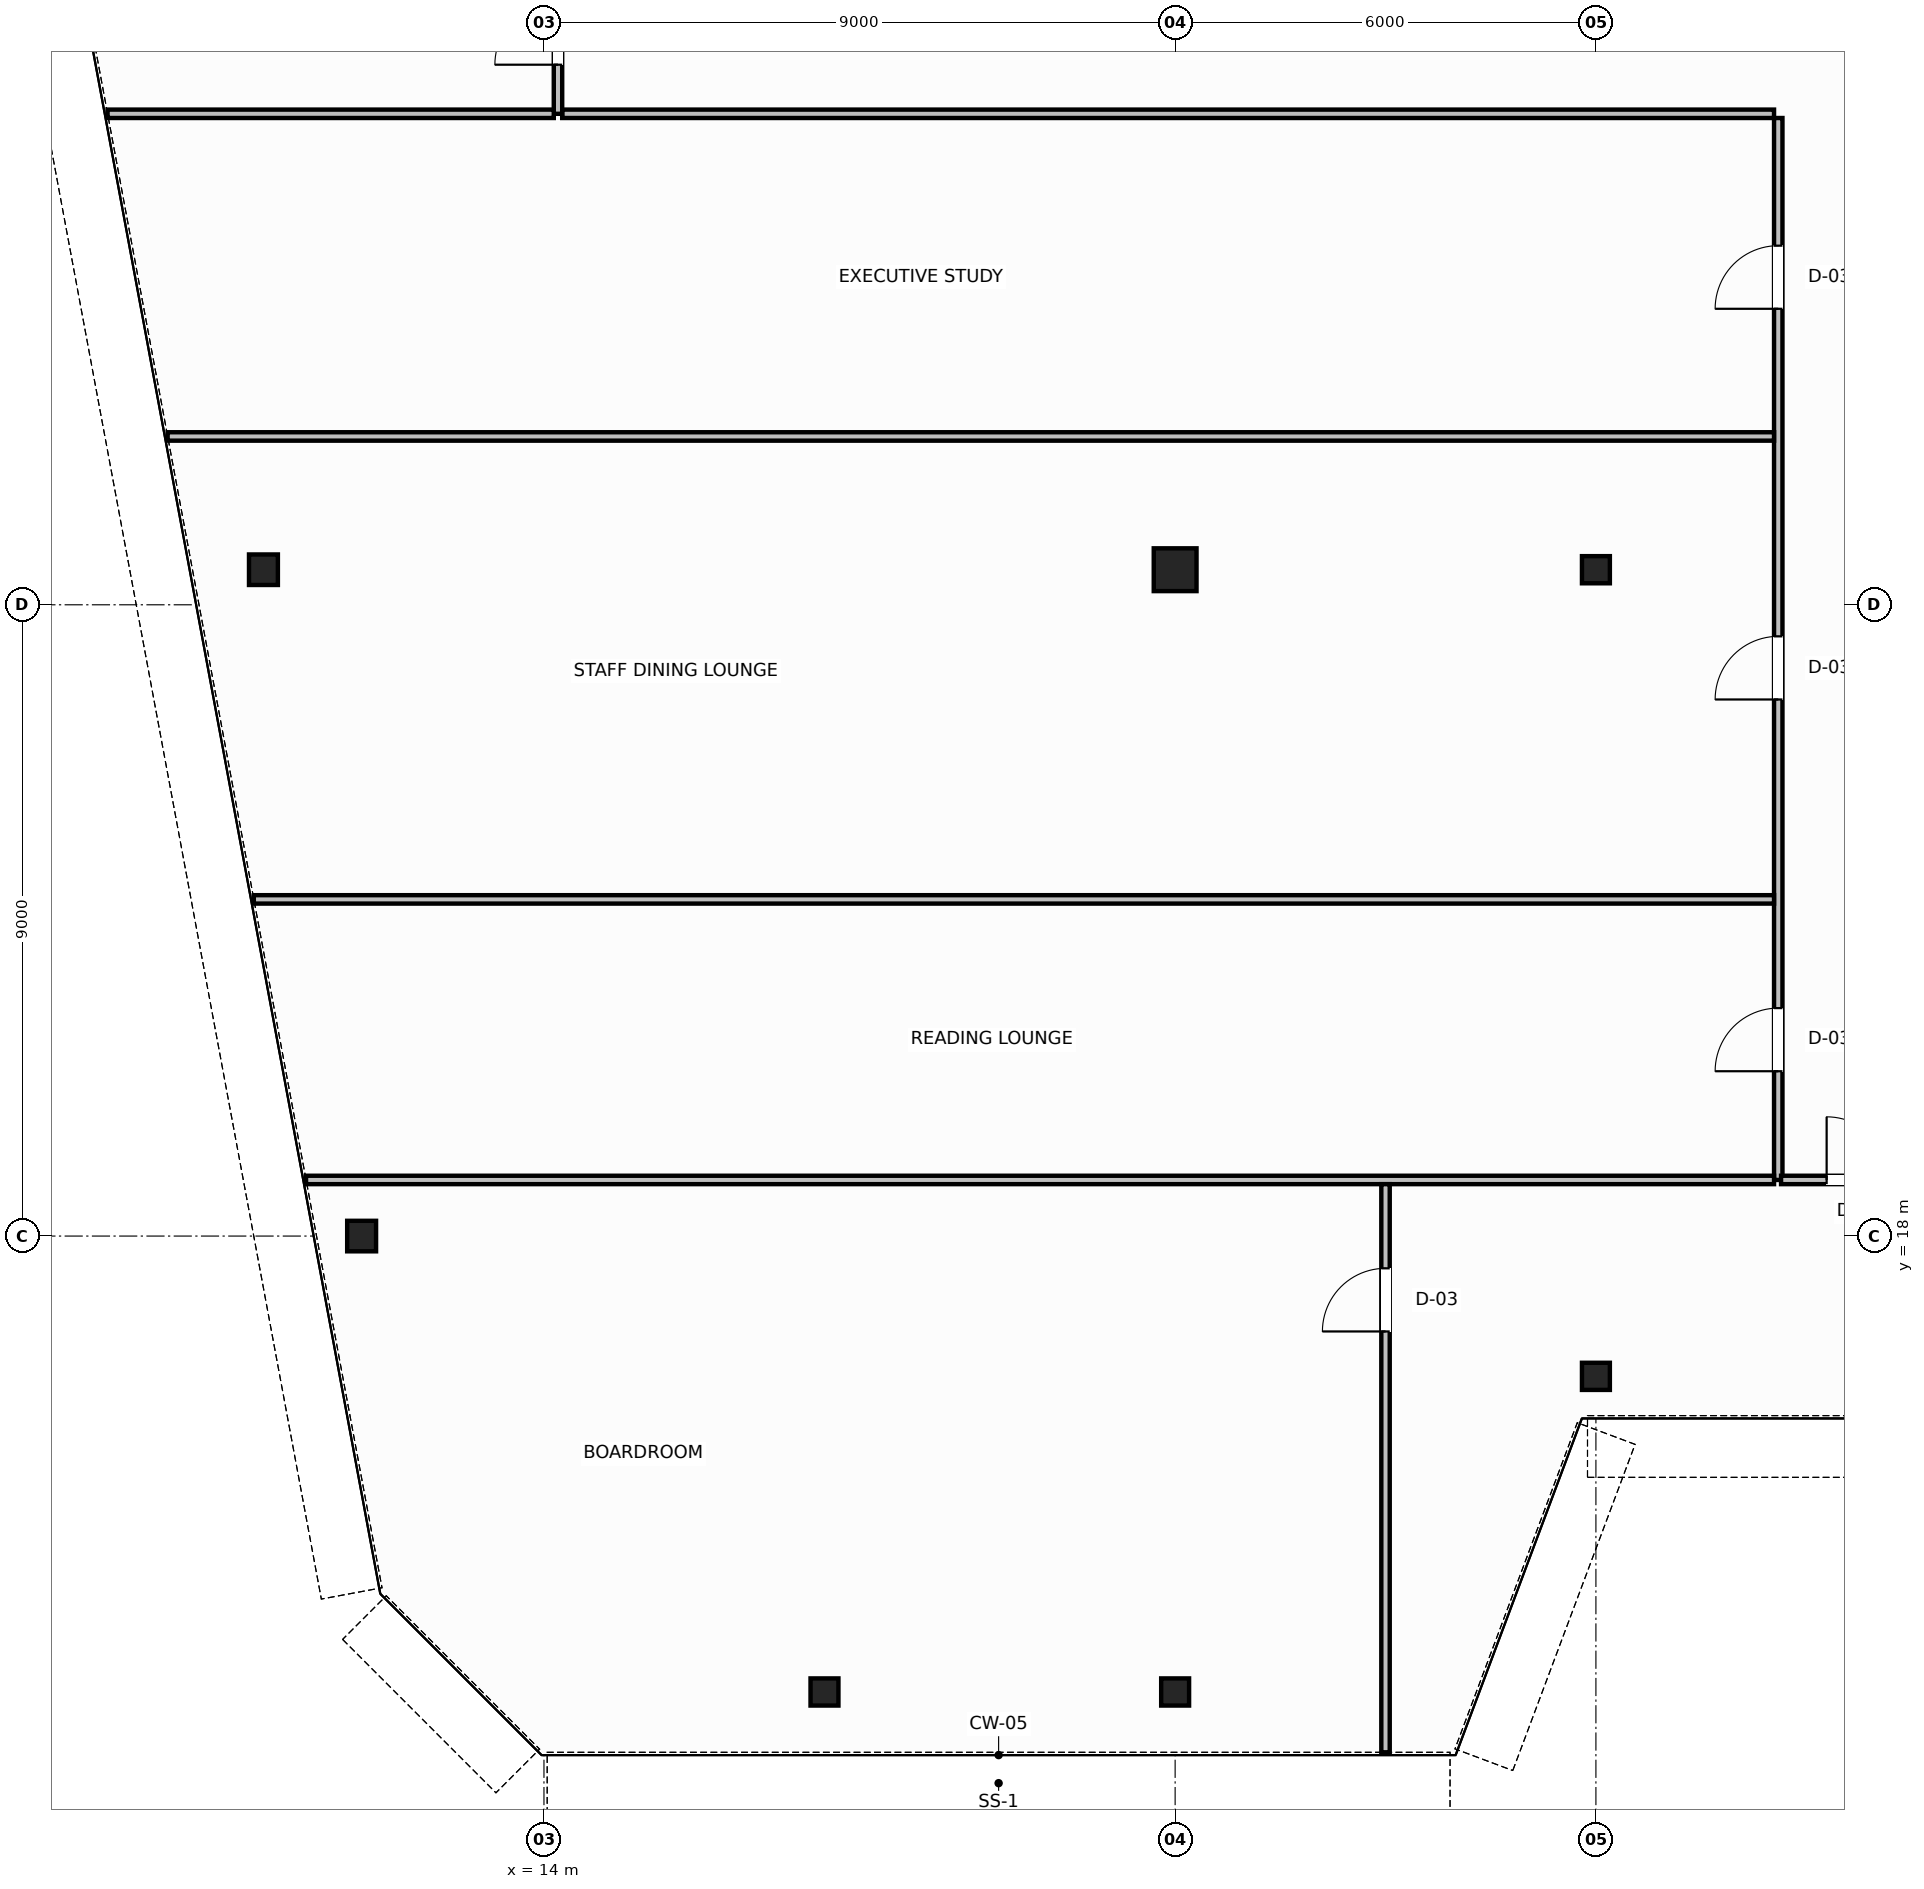
"""IFC4 building model, lengths in metres.
Left out: names, types, materials, properties, quantities, classifications, styles, units other than length and angle.
Written with IfcOpenShell. Run it as: python <this file> out.ifc"""

import sys

from ifc_helpers import new_model, si_unit, direction, frame, frame_2d, origin, origin_2d, place, context, subcontext, project, spatial, rectangle, hollow_circle, i_section, extrude, source, transform, mapped, element, fill, save


model = new_model("IFC4")
c1 = context("Model", 3, precision=1e-05, world=origin(), true_north=direction((0.0, 1.0)))
c2 = subcontext(c1, "Body", "Model", "MODEL_VIEW")
j1 = project(units=[si_unit("LENGTHUNIT", "METRE"), si_unit("PLANEANGLEUNIT", "RADIAN")], contexts=[c1])
p1 = place(None, origin())
s1 = spatial("IfcSite", under=j1, at=p1, CompositionType="ELEMENT")
p2 = place(p1, origin())
s2 = spatial("IfcBuilding", under=s1, at=p2, CompositionType="ELEMENT")
p3 = place(p2, frame((0.0, 0.0, 242.2)))
s3 = spatial("IfcBuildingStorey", under=s2, at=p3, CompositionType="ELEMENT", Elevation=242.2)
m1 = source(origin(), c2, "Body", "SweptSolid", [
    extrude(i_section(OverallWidth=0.412, OverallDepth=0.435, WebThickness=0.036, FlangeThickness=0.05, FilletRadius=0.015, at=origin_2d()), origin(), (0.0, 0.0, 1.0), 3.8),
])
for number, where, z_axis, x_axis in (
    (1, (10.0, 27.5, 0.0), (0.0, 0.0, 1.0), (1.0, 0.0, 0.0)),
    (2, (11.4, 18.0, 0.0), (0.0, 0.0, 1.0), (1.0, 0.0, 0.0)),
):
    element("IfcColumn", number, at=place(p3, frame(where, z_axis=z_axis, x_axis=x_axis)), inside=s3, PredefinedType="COLUMN", context=c2, shape_type="MappedRepresentation", body=[
        mapped(m1, transform((0.0, 0.0, 0.0), scale=1.0)),
    ])
m2 = source(origin(), c2, "Body", "SweptSolid", [
    extrude(hollow_circle(Radius=0.305, WallThickness=0.03, at=origin_2d()), origin(), (0.0, 0.0, 1.0), 3.8),
])
p4 = place(p3, frame((23.0, 27.5, 0.0), z_axis=(0.0, 0.0, 1.0), x_axis=(1.0, 0.0, 0.0)))
e3 = element("IfcColumn", 3, at=p4, inside=s3, PredefinedType="COLUMN", context=c2, shape_type="MappedRepresentation", body=[
    mapped(m2, transform((0.0, 0.0, 0.0), scale=1.0)),
])
m3 = source(origin(), c2, "Body", "SweptSolid", [
    extrude(i_section(OverallWidth=0.398, OverallDepth=0.387, WebThickness=0.021, FlangeThickness=0.029, FilletRadius=0.015, at=origin_2d()), origin(), (0.0, 0.0, 1.0), 3.8),
])
for number, where, z_axis, x_axis in (
    (4, (29.0, 27.5, 0.0), (0.0, 0.0, 1.0), (1.0, 0.0, 0.0)),
    (5, (18.0, 11.5, 0.0), (0.0, 0.0, 1.0), (1.0, 0.0, 0.0)),
    (6, (23.0, 11.5, 0.0), (0.0, 0.0, 1.0), (1.0, 0.0, 0.0)),
    (7, (29.0, 16.0, 0.0), (0.0, 0.0, 1.0), (1.0, 0.0, 0.0)),
):
    element("IfcColumn", number, at=place(p3, frame(where, z_axis=z_axis, x_axis=x_axis)), inside=s3, PredefinedType="COLUMN", context=c2, shape_type="MappedRepresentation", body=[
        mapped(m3, transform((0.0, 0.0, 0.0), scale=1.0)),
    ])
p5 = place(p3, frame((14.26, 34.0, 0.0), z_axis=(0.0, 0.0, 1.0), x_axis=(1.0, 0.0, 0.0)))
e8 = element("IfcWall", 8, at=p5, inside=s3, PredefinedType="PARTITIONING", context=c2, shape_type="SweptSolid", body=[
    extrude(rectangle(XDim=17.28, YDim=0.12, at=frame_2d((8.64, 0.0))), origin(), (0.0, 0.0, 1.0), 3.58),
])
p6 = place(p3, frame((14.2, 34.0, 0.0), z_axis=(0.0, 0.0, 1.0), x_axis=(0.0, 1.0, 0.0)))
e9 = element("IfcWall", 9, at=p6, inside=s3, PredefinedType="PARTITIONING", context=c2, shape_type="SweptSolid", body=[
    extrude(rectangle(XDim=2.44, YDim=0.12, at=frame_2d((1.22, 0.0))), origin(), (0.0, 0.0, 1.0), 3.58),
])
p7 = place(p6, frame((0.7, 0.0, 0.0)))
e10 = element("IfcOpeningElement", 10, at=p7, cuts=e9, PredefinedType="OPENING", context=c2, shape_type="SweptSolid", body=[
    extrude(rectangle(XDim=0.9, YDim=2.15, at=frame_2d((0.45, 1.075))), frame((0.0, 0.07, 0.0), z_axis=(0.0, -1.0, 0.0), x_axis=(1.0, 0.0, 0.0)), (0.0, 0.0, 1.0), 0.14),
])
p8 = place(p3, frame((31.6, 18.8, 0.0), z_axis=(0.0, 0.0, 1.0), x_axis=(0.0, 1.0, 0.0)))
e11 = element("IfcWall", 11, at=p8, inside=s3, PredefinedType="PARTITIONING", context=c2, shape_type="SweptSolid", body=[
    extrude(rectangle(XDim=15.14, YDim=0.12, at=frame_2d((7.57, 0.0))), origin(), (0.0, 0.0, 1.0), 3.58),
])
p9 = place(p8, frame((1.55, 0.0, 0.0)))
e12 = element("IfcOpeningElement", 12, at=p9, cuts=e11, PredefinedType="OPENING", context=c2, shape_type="SweptSolid", body=[
    extrude(rectangle(XDim=0.9, YDim=2.15, at=frame_2d((0.45, 1.075))), frame((0.0, 0.07, 0.0), z_axis=(0.0, -1.0, 0.0), x_axis=(1.0, 0.0, 0.0)), (0.0, 0.0, 1.0), 0.14),
])
p10 = place(p8, frame((6.85, 0.0, 0.0)))
e13 = element("IfcOpeningElement", 13, at=p10, cuts=e11, PredefinedType="OPENING", context=c2, shape_type="SweptSolid", body=[
    extrude(rectangle(XDim=0.9, YDim=2.15, at=frame_2d((0.45, 1.075))), frame((0.0, 0.07, 0.0), z_axis=(0.0, -1.0, 0.0), x_axis=(1.0, 0.0, 0.0)), (0.0, 0.0, 1.0), 0.14),
])
p11 = place(p8, frame((12.42, 0.0, 0.0)))
e14 = element("IfcOpeningElement", 14, at=p11, cuts=e11, PredefinedType="OPENING", context=c2, shape_type="SweptSolid", body=[
    extrude(rectangle(XDim=0.9, YDim=2.15, at=frame_2d((0.45, 1.075))), frame((0.0, 0.07, 0.0), z_axis=(0.0, -1.0, 0.0), x_axis=(1.0, 0.0, 0.0)), (0.0, 0.0, 1.0), 0.14),
])
p12 = place(p3, frame((31.64, 18.8, 0.0), z_axis=(0.0, 0.0, 1.0), x_axis=(1.0, 0.0, 0.0)))
e15 = element("IfcWall", 15, at=p12, inside=s3, PredefinedType="PARTITIONING", context=c2, shape_type="SweptSolid", body=[
    extrude(rectangle(XDim=2.32, YDim=0.12, at=frame_2d((1.16, 0.0))), origin(), (0.0, 0.0, 1.0), 3.58),
])
p13 = place(p12, frame((0.65, 0.0, 0.0)))
e16 = element("IfcOpeningElement", 16, at=p13, cuts=e15, PredefinedType="OPENING", context=c2, shape_type="SweptSolid", body=[
    extrude(rectangle(XDim=0.9, YDim=2.15, at=frame_2d((0.45, 1.075))), frame((0.0, 0.07, 0.0), z_axis=(0.0, -1.0, 0.0), x_axis=(1.0, 0.0, 0.0)), (0.0, 0.0, 1.0), 0.14),
])
p14 = place(p3, frame((7.777, 34.0, 0.0), z_axis=(0.0, 0.0, 1.0), x_axis=(1.0, 0.0, 0.0)))
e17 = element("IfcWall", 17, at=p14, inside=s3, PredefinedType="PARTITIONING", context=c2, shape_type="SweptSolid", body=[
    extrude(rectangle(XDim=6.363, YDim=0.12, at=frame_2d((3.181, 0.0))), origin(), (0.0, 0.0, 1.0), 3.58),
])
p15 = place(p3, frame((9.863, 22.8, 0.0), z_axis=(0.0, 0.0, 1.0), x_axis=(1.0, 0.0, 0.0)))
e18 = element("IfcWall", 18, at=p15, inside=s3, PredefinedType="PARTITIONING", context=c2, shape_type="SweptSolid", body=[
    extrude(rectangle(XDim=21.677, YDim=0.12, at=frame_2d((10.839, 0.0))), origin(), (0.0, 0.0, 1.0), 3.58),
])
p16 = place(p3, frame((8.634, 29.4, 0.0), z_axis=(0.0, 0.0, 1.0), x_axis=(1.0, 0.0, 0.0)))
e19 = element("IfcWall", 19, at=p16, inside=s3, PredefinedType="PARTITIONING", context=c2, shape_type="SweptSolid", body=[
    extrude(rectangle(XDim=22.906, YDim=0.12, at=frame_2d((11.453, 0.0))), origin(), (0.0, 0.0, 1.0), 3.58),
])
p17 = place(p3, frame((10.607, 18.8, 0.0), z_axis=(0.0, 0.0, 1.0), x_axis=(1.0, 0.0, 0.0)))
e20 = element("IfcWall", 20, at=p17, inside=s3, PredefinedType="PARTITIONING", context=c2, shape_type="SweptSolid", body=[
    extrude(rectangle(XDim=20.933, YDim=0.12, at=frame_2d((10.466, 0.0))), origin(), (0.0, 0.0, 1.0), 3.58),
])
p18 = place(p3, frame((26.0, 10.64, 0.0), z_axis=(0.0, 0.0, 1.0), x_axis=(0.0, 1.0, 0.0)))
e21 = element("IfcWall", 21, at=p18, inside=s3, PredefinedType="PARTITIONING", context=c2, shape_type="SweptSolid", body=[
    extrude(rectangle(XDim=8.1, YDim=0.12, at=frame_2d((4.05, 0.0))), origin(), (0.0, 0.0, 1.0), 3.58),
])
p19 = place(p18, frame((6.0, 0.0, 0.0)))
e22 = element("IfcOpeningElement", 22, at=p19, cuts=e21, PredefinedType="OPENING", context=c2, shape_type="SweptSolid", body=[
    extrude(rectangle(XDim=0.9, YDim=2.15, at=frame_2d((0.45, 1.075))), frame((0.0, 0.07, 0.0), z_axis=(0.0, -1.0, 0.0), x_axis=(1.0, 0.0, 0.0)), (0.0, 0.0, 1.0), 0.14),
])
m4 = source(origin(), c2, "Body", "SweptSolid", [
    extrude(rectangle(XDim=0.9, YDim=2.15, at=frame_2d((0.45, 1.075))), frame((0.0, 0.025, 0.0), z_axis=(0.0, -1.0, 0.0), x_axis=(1.0, 0.0, 0.0)), (0.0, 0.0, 1.0), 0.05),
])
p20 = place(p7, origin())
e23 = element("IfcDoor", 23, at=p20, inside=s3, OperationType="SINGLE_SWING_LEFT", PredefinedType="DOOR", context=c2, shape_type="MappedRepresentation", body=[
    mapped(m4, transform((0.0, 0.0, 0.0), scale=1.0)),
])
fill(e10, e23)
p21 = place(p9, origin())
e24 = element("IfcDoor", 24, at=p21, inside=s3, OperationType="SINGLE_SWING_LEFT", PredefinedType="DOOR", context=c2, shape_type="MappedRepresentation", body=[
    mapped(m4, transform((0.0, 0.0, 0.0), scale=1.0)),
])
fill(e12, e24)
p22 = place(p10, origin())
e25 = element("IfcDoor", 25, at=p22, inside=s3, OperationType="SINGLE_SWING_RIGHT", PredefinedType="DOOR", context=c2, shape_type="MappedRepresentation", body=[
    mapped(m4, transform((0.0, 0.0, 0.0), scale=1.0)),
])
fill(e13, e25)
p23 = place(p11, origin())
e26 = element("IfcDoor", 26, at=p23, inside=s3, OperationType="SINGLE_SWING_LEFT", PredefinedType="DOOR", context=c2, shape_type="MappedRepresentation", body=[
    mapped(m4, transform((0.0, 0.0, 0.0), scale=1.0)),
])
fill(e14, e26)
p24 = place(p19, origin())
e27 = element("IfcDoor", 27, at=p24, inside=s3, OperationType="SINGLE_SWING_RIGHT", PredefinedType="DOOR", context=c2, shape_type="MappedRepresentation", body=[
    mapped(m4, transform((0.0, 0.0, 0.0), scale=1.0)),
])
fill(e22, e27)
p25 = place(p13, origin())
e28 = element("IfcDoor", 28, at=p25, inside=s3, OperationType="SINGLE_SWING_LEFT", PredefinedType="DOOR", context=c2, shape_type="MappedRepresentation", body=[
    mapped(m4, transform((0.0, 0.0, 0.0), scale=1.0)),
])
fill(e16, e28)
save(model, sys.argv[1])
